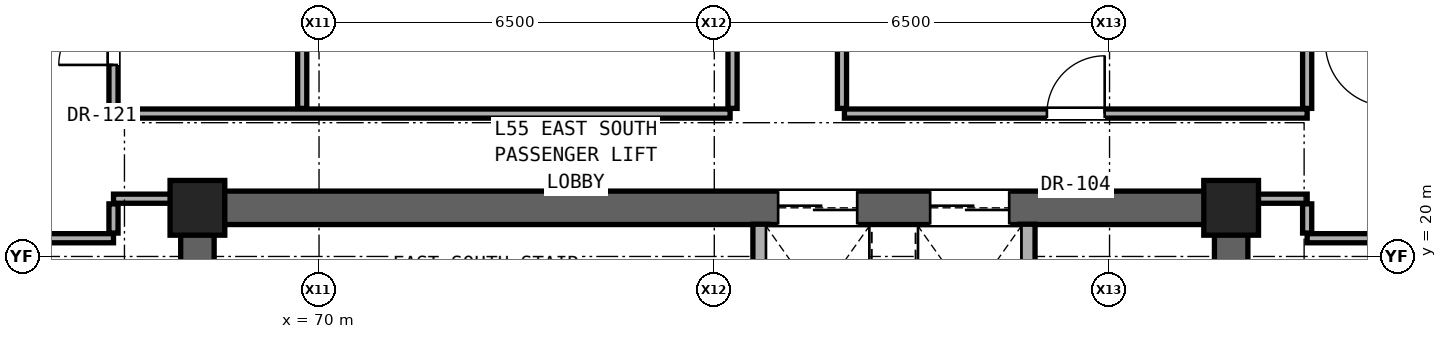
"""IFC4 building model, lengths in metres.
Left out: names, types, materials, properties, quantities, classifications, styles, units other than length and angle.
Written with IfcOpenShell. Run it as: python <this file> out.ifc"""

import sys

from ifc_helpers import new_model, si_unit, direction, frame, frame_2d, origin, origin_2d, place, context, subcontext, project, spatial, rectangle, extrude, element, fill, save


model = new_model("IFC4")
c1 = context("Model", 3, precision=1e-05, world=origin(), true_north=direction((0.0, 1.0)))
c2 = subcontext(c1, "Body", "Model", "MODEL_VIEW")
j1 = project(units=[si_unit("LENGTHUNIT", "METRE"), si_unit("PLANEANGLEUNIT", "RADIAN")], contexts=[c1])
p1 = place(None, origin())
s1 = spatial("IfcSite", under=j1, at=p1, CompositionType="ELEMENT")
p2 = place(p1, origin())
s2 = spatial("IfcBuilding", under=s1, at=p2, CompositionType="ELEMENT")
p3 = place(p2, frame((0.0, 0.0, 193.4)))
s3 = spatial("IfcBuildingStorey", under=s2, at=p3, CompositionType="ELEMENT", Elevation=193.4)
for number, where, z_axis, x_axis in (
    (1, (68.0, 20.8, 0.0), (0.0, 0.0, 1.0), (1.0, 0.0, 0.0)),
    (2, (85.0, 20.8, 0.0), (0.0, 0.0, 1.0), (1.0, 0.0, 0.0)),
):
    element("IfcColumn", number, at=place(p3, frame(where, z_axis=z_axis, x_axis=x_axis)), inside=s3, PredefinedType="COLUMN", context=c2, shape_type="SweptSolid", body=[
        extrude(rectangle(XDim=0.9, YDim=0.9, at=origin_2d()), origin(), (0.0, 0.0, 1.0), 3.25),
    ])
for number, where, z_axis, x_axis in (
    (3, (68.0, 15.2, 0.0), (0.0, 0.0, 1.0), (0.0, 1.0, 0.0)),
    (4, (85.0, 15.2, 0.0), (0.0, 0.0, 1.0), (0.0, 1.0, 0.0)),
):
    element("IfcWall", number, at=place(p3, frame(where, z_axis=z_axis, x_axis=x_axis)), inside=s3, PredefinedType="SHEAR", context=c2, shape_type="SweptSolid", body=[
        extrude(rectangle(XDim=5.6, YDim=0.55, at=frame_2d((2.8, 0.0))), origin(), (0.0, 0.0, 1.0), 3.05),
    ])
p4 = place(p3, frame((68.0, 20.8, 0.0), z_axis=(0.0, 0.0, 1.0), x_axis=(1.0, 0.0, 0.0)))
e5 = element("IfcWall", 5, at=p4, inside=s3, PredefinedType="SHEAR", context=c2, shape_type="SweptSolid", body=[
    extrude(rectangle(XDim=17.0, YDim=0.55, at=frame_2d((8.5, 0.0))), origin(), (0.0, 0.0, 1.0), 3.05),
])
p5 = place(p4, frame((9.55, 0.0, 0.0)))
e6 = element("IfcOpeningElement", 6, at=p5, cuts=e5, PredefinedType="OPENING", context=c2, shape_type="SweptSolid", body=[
    extrude(rectangle(XDim=1.3, YDim=2.3, at=frame_2d((0.65, 1.15))), frame((0.0, 0.285, 0.0), z_axis=(0.0, -1.0, 0.0), x_axis=(1.0, 0.0, 0.0)), (0.0, 0.0, 1.0), 0.57),
])
p6 = place(p4, frame((12.05, 0.0, 0.0)))
e7 = element("IfcOpeningElement", 7, at=p6, cuts=e5, PredefinedType="OPENING", context=c2, shape_type="SweptSolid", body=[
    extrude(rectangle(XDim=1.3, YDim=2.3, at=frame_2d((0.65, 1.15))), frame((0.0, 0.285, 0.0), z_axis=(0.0, -1.0, 0.0), x_axis=(1.0, 0.0, 0.0)), (0.0, 0.0, 1.0), 0.57),
])
p7 = place(p3, frame((65.25, 20.3, 0.0), z_axis=(0.0, 0.0, 1.0), x_axis=(1.0, 0.0, 0.0)))
e8 = element("IfcWall", 8, at=p7, inside=s3, PredefinedType="PARTITIONING", context=c2, shape_type="SweptSolid", body=[
    extrude(rectangle(XDim=1.37, YDim=0.15, at=frame_2d((0.685, 0.0))), origin(), (0.0, 0.0, 1.0), 3.05),
])
p8 = place(p3, frame((86.25, 20.3, 0.0), z_axis=(0.0, 0.0, 1.0), x_axis=(1.0, 0.0, 0.0)))
e9 = element("IfcWall", 9, at=p8, inside=s3, PredefinedType="PARTITIONING", context=c2, shape_type="SweptSolid", body=[
    extrude(rectangle(XDim=1.35, YDim=0.15, at=frame_2d((0.675, 0.0))), origin(), (0.0, 0.0, 1.0), 3.05),
])
p9 = place(p3, frame((66.62, 20.95, 0.0), z_axis=(0.0, 0.0, 1.0), x_axis=(1.0, 0.0, 0.0)))
e10 = element("IfcWall", 10, at=p9, inside=s3, PredefinedType="PARTITIONING", context=c2, shape_type="SweptSolid", body=[
    extrude(rectangle(XDim=1.11, YDim=0.15, at=frame_2d((0.555, 0.0))), origin(), (0.0, 0.0, 1.0), 2.442),
])
p10 = place(p3, frame((85.27, 20.95, 0.0), z_axis=(0.0, 0.0, 1.0), x_axis=(1.0, 0.0, 0.0)))
e11 = element("IfcWall", 11, at=p10, inside=s3, PredefinedType="PARTITIONING", context=c2, shape_type="SweptSolid", body=[
    extrude(rectangle(XDim=0.98, YDim=0.15, at=frame_2d((0.49, 0.0))), origin(), (0.0, 0.0, 1.0), 2.442),
])
p11 = place(p3, frame((66.62, 22.35, 0.0), z_axis=(0.0, 0.0, 1.0), x_axis=(1.0, 0.0, 0.0)))
e12 = element("IfcWall", 12, at=p11, inside=s3, PredefinedType="PARTITIONING", context=c2, shape_type="SweptSolid", body=[
    extrude(rectangle(XDim=10.14, YDim=0.15, at=frame_2d((5.07, 0.0))), origin(), (0.0, 0.0, 1.0), 2.186),
])
p12 = place(p3, frame((78.64, 22.35, 0.0), z_axis=(0.0, 0.0, 1.0), x_axis=(1.0, 0.0, 0.0)))
e13 = element("IfcWall", 13, at=p12, inside=s3, PredefinedType="PARTITIONING", context=c2, shape_type="SweptSolid", body=[
    extrude(rectangle(XDim=7.61, YDim=0.15, at=frame_2d((3.805, 0.0))), origin(), (0.0, 0.0, 1.0), 2.186),
])
p13 = place(p12, frame((3.33, 0.0, 0.0)))
e14 = element("IfcOpeningElement", 14, at=p13, cuts=e13, PredefinedType="OPENING", context=c2, shape_type="SweptSolid", body=[
    extrude(rectangle(XDim=0.95, YDim=2.15, at=frame_2d((0.475, 1.075))), frame((0.0, 0.085, 0.0), z_axis=(0.0, -1.0, 0.0), x_axis=(1.0, 0.0, 0.0)), (0.0, 0.0, 1.0), 0.17),
])
p14 = place(p3, frame((66.62, 20.385, 0.0), z_axis=(0.0, 0.0, 1.0), x_axis=(0.0, 1.0, 0.0)))
e15 = element("IfcWall", 15, at=p14, inside=s3, PredefinedType="PARTITIONING", context=c2, shape_type="SweptSolid", body=[
    extrude(rectangle(XDim=0.48, YDim=0.15, at=frame_2d((0.24, 0.0))), origin(), (0.0, 0.0, 1.0), 2.442),
])
p15 = place(p3, frame((66.62, 22.435, 0.0), z_axis=(0.0, 0.0, 1.0), x_axis=(0.0, 1.0, 0.0)))
e16 = element("IfcWall", 16, at=p15, inside=s3, PredefinedType="PARTITIONING", context=c2, shape_type="SweptSolid", body=[
    extrude(rectangle(XDim=2.33, YDim=0.15, at=frame_2d((1.165, 0.0))), origin(), (0.0, 0.0, 1.0), 3.05),
])
p16 = place(p15, frame((0.715, 0.0, 0.0)))
e17 = element("IfcOpeningElement", 17, at=p16, cuts=e16, PredefinedType="OPENING", context=c2, shape_type="SweptSolid", body=[
    extrude(rectangle(XDim=0.9, YDim=2.1, at=frame_2d((0.45, 1.05))), frame((0.0, 0.085, 0.0), z_axis=(0.0, -1.0, 0.0), x_axis=(1.0, 0.0, 0.0)), (0.0, 0.0, 1.0), 0.17),
])
p17 = place(p3, frame((69.723, 22.435, 0.0), z_axis=(0.0, 0.0, 1.0), x_axis=(0.0, 1.0, 0.0)))
e18 = element("IfcWall", 18, at=p17, inside=s3, PredefinedType="PARTITIONING", context=c2, shape_type="SweptSolid", body=[
    extrude(rectangle(XDim=2.33, YDim=0.15, at=frame_2d((1.165, 0.0))), origin(), (0.0, 0.0, 1.0), 3.05),
])
p18 = place(p3, frame((76.8, 22.435, 0.0), z_axis=(0.0, 0.0, 1.0), x_axis=(0.0, 1.0, 0.0)))
e19 = element("IfcWall", 19, at=p18, inside=s3, PredefinedType="PARTITIONING", context=c2, shape_type="SweptSolid", body=[
    extrude(rectangle(XDim=8.13, YDim=0.15, at=frame_2d((4.065, 0.0))), origin(), (0.0, 0.0, 1.0), 2.186),
])
p19 = place(p3, frame((77.26, 18.735, 0.0), z_axis=(0.0, 0.0, 1.0), x_axis=(0.0, 1.0, 0.0)))
e20 = element("IfcWall", 20, at=p19, inside=s3, PredefinedType="SOLIDWALL", context=c2, shape_type="SweptSolid", body=[
    extrude(rectangle(XDim=1.795, YDim=0.25, at=frame_2d((0.897, 0.0))), origin(), (0.0, 0.0, 1.0), 3.05),
])
p20 = place(p3, frame((78.6, 22.435, 0.0), z_axis=(0.0, 0.0, 1.0), x_axis=(0.0, 1.0, 0.0)))
e21 = element("IfcWall", 21, at=p20, inside=s3, PredefinedType="PARTITIONING", context=c2, shape_type="SweptSolid", body=[
    extrude(rectangle(XDim=3.08, YDim=0.15, at=frame_2d((1.54, 0.0))), origin(), (0.0, 0.0, 1.0), 3.05),
])
p21 = place(p3, frame((81.65, 18.185, 0.0), z_axis=(0.0, 0.0, 1.0), x_axis=(0.0, 1.0, 0.0)))
e22 = element("IfcWall", 22, at=p21, inside=s3, PredefinedType="SOLIDWALL", context=c2, shape_type="SweptSolid", body=[
    extrude(rectangle(XDim=2.345, YDim=0.25, at=frame_2d((1.172, 0.0))), origin(), (0.0, 0.0, 1.0), 3.05),
])
p22 = place(p3, frame((86.25, 20.385, 0.0), z_axis=(0.0, 0.0, 1.0), x_axis=(0.0, 1.0, 0.0)))
e23 = element("IfcWall", 23, at=p22, inside=s3, PredefinedType="PARTITIONING", context=c2, shape_type="SweptSolid", body=[
    extrude(rectangle(XDim=0.48, YDim=0.15, at=frame_2d((0.24, 0.0))), origin(), (0.0, 0.0, 1.0), 2.442),
])
p23 = place(p3, frame((86.25, 22.435, 0.0), z_axis=(0.0, 0.0, 1.0), x_axis=(0.0, 1.0, 0.0)))
e24 = element("IfcWall", 24, at=p23, inside=s3, PredefinedType="PARTITIONING", context=c2, shape_type="SweptSolid", body=[
    extrude(rectangle(XDim=3.08, YDim=0.15, at=frame_2d((1.54, 0.0))), origin(), (0.0, 0.0, 1.0), 3.05),
])
p24 = place(p16, origin())
e25 = element("IfcDoor", 25, at=p24, inside=s3, OperationType="SINGLE_SWING_LEFT", PredefinedType="DOOR", context=c2, shape_type="SweptSolid", body=[
    extrude(rectangle(XDim=0.9, YDim=2.1, at=frame_2d((0.45, 1.05))), frame((0.0, 0.025, 0.0), z_axis=(0.0, -1.0, 0.0), x_axis=(1.0, 0.0, 0.0)), (0.0, 0.0, 1.0), 0.05),
])
fill(e17, e25)
p25 = place(p13, origin())
e26 = element("IfcDoor", 26, at=p25, inside=s3, OperationType="SINGLE_SWING_RIGHT", PredefinedType="DOOR", context=c2, shape_type="SweptSolid", body=[
    extrude(rectangle(XDim=0.95, YDim=2.15, at=frame_2d((0.475, 1.075))), frame((0.0, 0.025, 0.0), z_axis=(0.0, -1.0, 0.0), x_axis=(1.0, 0.0, 0.0)), (0.0, 0.0, 1.0), 0.05),
])
fill(e14, e26)
p26 = place(p5, origin())
e27 = element("IfcDoor", 27, at=p26, inside=s3, OperationType="DOUBLE_DOOR_SLIDING", PredefinedType="DOOR", context=c2, shape_type="SweptSolid", body=[
    extrude(rectangle(XDim=1.3, YDim=2.3, at=frame_2d((0.65, 1.15))), frame((0.0, 0.025, 0.0), z_axis=(0.0, -1.0, 0.0), x_axis=(1.0, 0.0, 0.0)), (0.0, 0.0, 1.0), 0.05),
])
fill(e6, e27)
p27 = place(p6, origin())
e28 = element("IfcDoor", 28, at=p27, inside=s3, OperationType="DOUBLE_DOOR_SLIDING", PredefinedType="DOOR", context=c2, shape_type="SweptSolid", body=[
    extrude(rectangle(XDim=1.3, YDim=2.3, at=frame_2d((0.65, 1.15))), frame((0.0, 0.025, 0.0), z_axis=(0.0, -1.0, 0.0), x_axis=(1.0, 0.0, 0.0)), (0.0, 0.0, 1.0), 0.05),
])
fill(e7, e28)
save(model, sys.argv[1])
